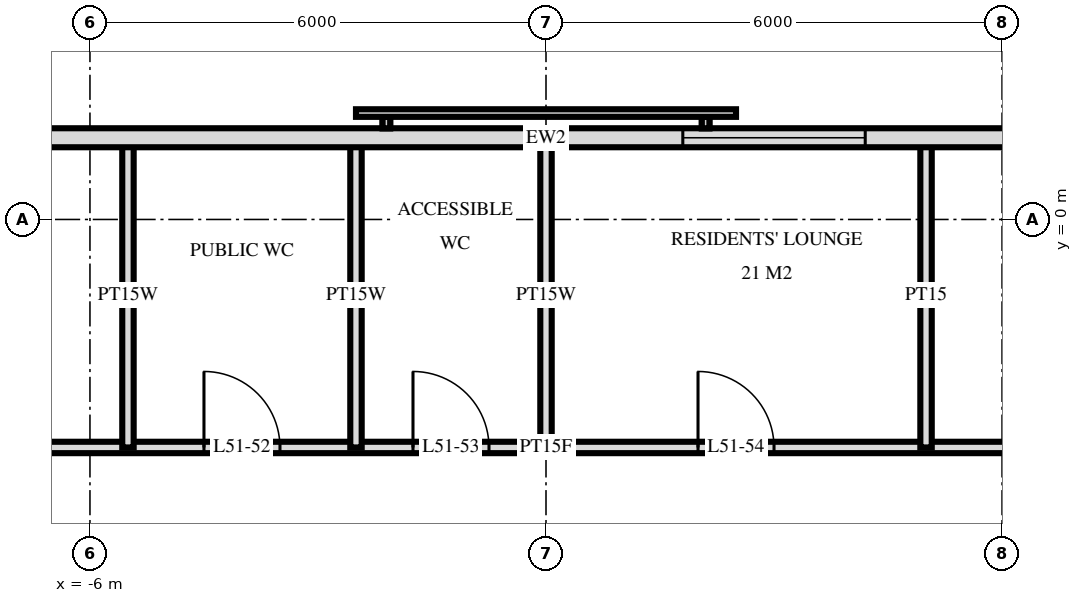
"""IFC4 building model, lengths in metres.
Left out: names, types, materials, properties, quantities, classifications, styles, units other than length and angle.
Written with IfcOpenShell. Run it as: python <this file> out.ifc"""

import sys

from ifc_helpers import new_model, si_unit, direction, frame, frame_2d, origin, place, context, subcontext, project, spatial, rectangle, extrude, element, fill, save


model = new_model("IFC4")
c1 = context("Model", 3, precision=1e-05, world=origin(), true_north=direction((0.0, 1.0)))
c2 = subcontext(c1, "Body", "Model", "MODEL_VIEW")
j1 = project(units=[si_unit("LENGTHUNIT", "METRE"), si_unit("PLANEANGLEUNIT", "RADIAN")], contexts=[c1])
p1 = place(None, origin())
s1 = spatial("IfcSite", under=j1, at=p1, CompositionType="ELEMENT")
p2 = place(p1, origin())
s2 = spatial("IfcBuilding", under=s1, at=p2, CompositionType="ELEMENT")
p3 = place(p2, frame((0.0, 0.0, 197.6)))
s3 = spatial("IfcBuildingStorey", under=s2, at=p3, CompositionType="ELEMENT", Elevation=197.6)
p4 = place(p3, frame((22.475, 1.075, 0.0), z_axis=(0.0, 0.0, 1.0), x_axis=(-1.0, 0.0, 0.0)))
e1 = element("IfcWall", 1, at=p4, inside=s3, PredefinedType="SOLIDWALL", context=c2, shape_type="SweptSolid", body=[
    extrude(rectangle(XDim=44.951, YDim=0.25, at=frame_2d((22.475, 0.0))), origin(), (0.0, 0.0, 1.0), 3.22),
])
p5 = place(p4, frame((13.775, 0.0, 0.9)))
e2 = element("IfcOpeningElement", 2, at=p5, cuts=e1, PredefinedType="OPENING", context=c2, shape_type="SweptSolid", body=[
    extrude(rectangle(XDim=2.4, YDim=1.5, at=frame_2d((1.2, 0.75))), frame((0.0, 0.135, 0.0), z_axis=(0.0, -1.0, 0.0), x_axis=(1.0, 0.0, 0.0)), (0.0, 0.0, 1.0), 0.27),
])
p6 = place(p4, frame((18.275, 0.0, 0.9)))
e3 = element("IfcOpeningElement", 3, at=p6, cuts=e1, PredefinedType="OPENING", context=c2, shape_type="SweptSolid", body=[
    extrude(rectangle(XDim=2.4, YDim=1.5, at=frame_2d((1.2, 0.75))), frame((0.0, 0.135, 0.0), z_axis=(0.0, -1.0, 0.0), x_axis=(1.0, 0.0, 0.0)), (0.0, 0.0, 1.0), 0.27),
])
p7 = place(p4, frame((29.025, 0.0, 0.9)))
e4 = element("IfcOpeningElement", 4, at=p7, cuts=e1, PredefinedType="OPENING", context=c2, shape_type="SweptSolid", body=[
    extrude(rectangle(XDim=2.4, YDim=1.5, at=frame_2d((1.2, 0.75))), frame((0.0, 0.135, 0.0), z_axis=(0.0, -1.0, 0.0), x_axis=(1.0, 0.0, 0.0)), (0.0, 0.0, 1.0), 0.27),
])
p8 = place(p3, frame((5.0, -3.0, 0.0), z_axis=(0.0, 0.0, 1.0), x_axis=(0.0, 1.0, 0.0)))
e5 = element("IfcWall", 5, at=p8, inside=s3, PredefinedType="PARTITIONING", context=c2, shape_type="SweptSolid", body=[
    extrude(rectangle(XDim=4.02, YDim=0.15, at=frame_2d((2.01, 0.0))), origin(), (0.0, 0.0, 1.0), 3.22),
])
for number, where, z_axis, x_axis in (
    (6, (0.0, -3.0, 0.0), (0.0, 0.0, 1.0), (0.0, 1.0, 0.0)),
    (7, (-2.5, -3.0, 0.0), (0.0, 0.0, 1.0), (0.0, 1.0, 0.0)),
    (8, (-5.5, -3.0, 0.0), (0.0, 0.0, 1.0), (0.0, 1.0, 0.0)),
):
    element("IfcWall", number, at=place(p3, frame(where, z_axis=z_axis, x_axis=x_axis)), inside=s3, PredefinedType="PLUMBINGWALL", context=c2, shape_type="SweptSolid", body=[
        extrude(rectangle(XDim=4.02, YDim=0.15, at=frame_2d((2.01, 0.0))), origin(), (0.0, 0.0, 1.0), 3.22),
    ])
p9 = place(p3, frame((-9.95, -3.0, 0.0), z_axis=(0.0, 0.0, 1.0), x_axis=(1.0, 0.0, 0.0)))
e9 = element("IfcWall", 9, at=p9, inside=s3, PredefinedType="PARTITIONING", context=c2, shape_type="SweptSolid", body=[
    extrude(rectangle(XDim=19.9, YDim=0.15, at=frame_2d((9.95, 0.0))), origin(), (0.0, 0.0, 1.0), 3.22),
])
p10 = place(p9, frame((1.7, 0.0, 0.0)))
e10 = element("IfcOpeningElement", 10, at=p10, cuts=e9, PredefinedType="OPENING", context=c2, shape_type="SweptSolid", body=[
    extrude(rectangle(XDim=1.0, YDim=2.1, at=frame_2d((0.5, 1.05))), frame((0.0, 0.085, 0.0), z_axis=(0.0, -1.0, 0.0), x_axis=(1.0, 0.0, 0.0)), (0.0, 0.0, 1.0), 0.17),
])
p11 = place(p9, frame((5.45, 0.0, 0.0)))
e11 = element("IfcOpeningElement", 11, at=p11, cuts=e9, PredefinedType="OPENING", context=c2, shape_type="SweptSolid", body=[
    extrude(rectangle(XDim=1.0, YDim=2.1, at=frame_2d((0.5, 1.05))), frame((0.0, 0.085, 0.0), z_axis=(0.0, -1.0, 0.0), x_axis=(1.0, 0.0, 0.0)), (0.0, 0.0, 1.0), 0.17),
])
p12 = place(p9, frame((8.2, 0.0, 0.0)))
e12 = element("IfcOpeningElement", 12, at=p12, cuts=e9, PredefinedType="OPENING", context=c2, shape_type="SweptSolid", body=[
    extrude(rectangle(XDim=1.0, YDim=2.1, at=frame_2d((0.5, 1.05))), frame((0.0, 0.085, 0.0), z_axis=(0.0, -1.0, 0.0), x_axis=(1.0, 0.0, 0.0)), (0.0, 0.0, 1.0), 0.17),
])
p13 = place(p9, frame((11.95, 0.0, 0.0)))
e13 = element("IfcOpeningElement", 13, at=p13, cuts=e9, PredefinedType="OPENING", context=c2, shape_type="SweptSolid", body=[
    extrude(rectangle(XDim=1.0, YDim=2.1, at=frame_2d((0.5, 1.05))), frame((0.0, 0.085, 0.0), z_axis=(0.0, -1.0, 0.0), x_axis=(1.0, 0.0, 0.0)), (0.0, 0.0, 1.0), 0.17),
])
p14 = place(p9, frame((16.95, 0.0, 0.0)))
e14 = element("IfcOpeningElement", 14, at=p14, cuts=e9, PredefinedType="OPENING", context=c2, shape_type="SweptSolid", body=[
    extrude(rectangle(XDim=1.0, YDim=2.1, at=frame_2d((0.5, 1.05))), frame((0.0, 0.085, 0.0), z_axis=(0.0, -1.0, 0.0), x_axis=(1.0, 0.0, 0.0)), (0.0, 0.0, 1.0), 0.17),
])
p15 = place(p6, origin())
e15 = element("IfcWindow", 15, at=p15, inside=s3, PartitioningType="SINGLE_PANEL", PredefinedType="WINDOW", context=c2, shape_type="SweptSolid", body=[
    extrude(rectangle(XDim=2.4, YDim=1.5, at=frame_2d((1.2, 0.75))), frame((0.0, 0.03, 0.0), z_axis=(0.0, -1.0, 0.0), x_axis=(1.0, 0.0, 0.0)), (0.0, 0.0, 1.0), 0.06),
])
fill(e3, e15)
p16 = place(p11, origin())
e16 = element("IfcDoor", 16, at=p16, inside=s3, OperationType="SINGLE_SWING_RIGHT", PredefinedType="DOOR", context=c2, shape_type="SweptSolid", body=[
    extrude(rectangle(XDim=1.0, YDim=2.1, at=frame_2d((0.5, 1.05))), frame((0.0, 0.025, 0.0), z_axis=(0.0, -1.0, 0.0), x_axis=(1.0, 0.0, 0.0)), (0.0, 0.0, 1.0), 0.05),
])
fill(e11, e16)
p17 = place(p12, origin())
e17 = element("IfcDoor", 17, at=p17, inside=s3, OperationType="SINGLE_SWING_RIGHT", PredefinedType="DOOR", context=c2, shape_type="SweptSolid", body=[
    extrude(rectangle(XDim=1.0, YDim=2.1, at=frame_2d((0.5, 1.05))), frame((0.0, 0.025, 0.0), z_axis=(0.0, -1.0, 0.0), x_axis=(1.0, 0.0, 0.0)), (0.0, 0.0, 1.0), 0.05),
])
fill(e12, e17)
p18 = place(p13, origin())
e18 = element("IfcDoor", 18, at=p18, inside=s3, OperationType="SINGLE_SWING_RIGHT", PredefinedType="DOOR", context=c2, shape_type="SweptSolid", body=[
    extrude(rectangle(XDim=1.0, YDim=2.1, at=frame_2d((0.5, 1.05))), frame((0.0, 0.025, 0.0), z_axis=(0.0, -1.0, 0.0), x_axis=(1.0, 0.0, 0.0)), (0.0, 0.0, 1.0), 0.05),
])
fill(e13, e18)
save(model, sys.argv[1])
